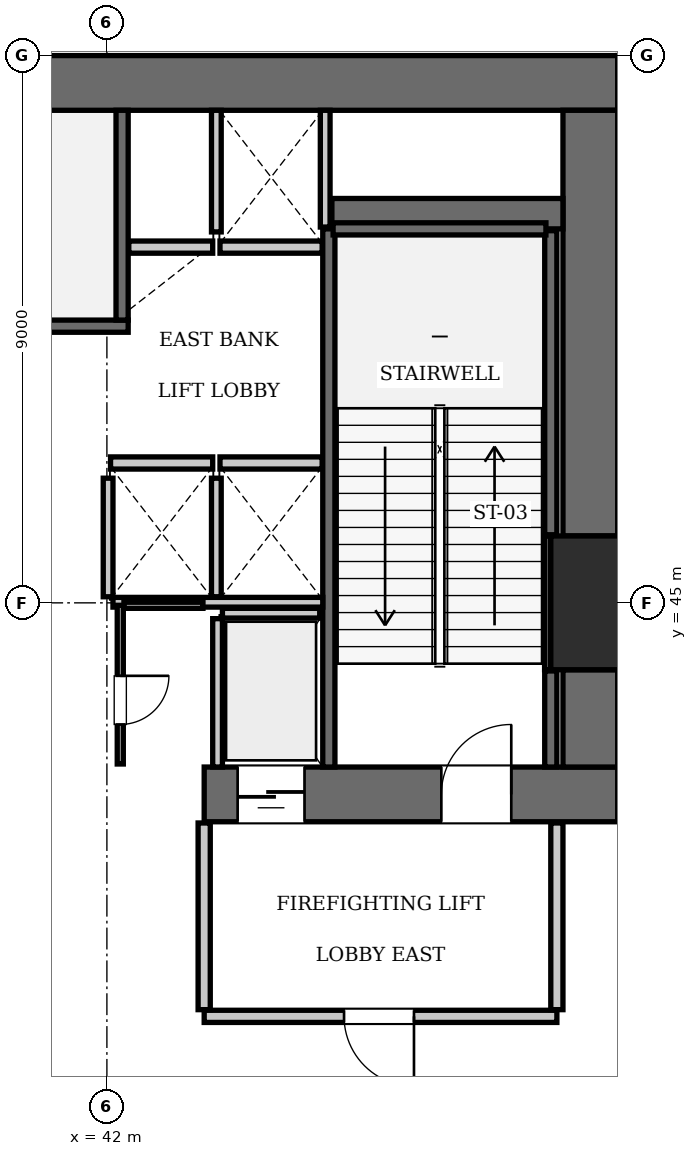
"""IFC4 building model, lengths in metres.
Left out: names, types, materials, properties, quantities, classifications, styles, units other than length and angle.
Written with IfcOpenShell. Run it as: python <this file> out.ifc"""

import sys

from ifc_helpers import new_model, si_unit, direction, frame, frame_2d, origin, origin_2d, place, context, subcontext, project, spatial, rectangle, extrude, element, fill, save


model = new_model("IFC4")
c1 = context("Model", 3, precision=1e-05, world=origin(), true_north=direction((0.0, 1.0)))
c2 = subcontext(c1, "Body", "Model", "MODEL_VIEW")
j1 = project(units=[si_unit("LENGTHUNIT", "METRE"), si_unit("PLANEANGLEUNIT", "RADIAN")], contexts=[c1])
p1 = place(None, origin())
s1 = spatial("IfcSite", under=j1, at=p1, CompositionType="ELEMENT")
p2 = place(p1, origin())
s2 = spatial("IfcBuilding", under=s1, at=p2, CompositionType="ELEMENT")
p3 = place(p2, frame((0.0, 0.0, 21.35)))
s3 = spatial("IfcBuildingStorey", under=s2, at=p3, CompositionType="ELEMENT", Elevation=21.35)
p4 = place(p3, frame((50.4, 45.0, 0.0), z_axis=(0.0, 0.0, 1.0), x_axis=(1.0, 0.0, 0.0)))
e1 = element("IfcColumn", 1, at=p4, inside=s3, PredefinedType="COLUMN", context=c2, shape_type="SweptSolid", body=[
    extrude(rectangle(XDim=2.2, YDim=2.2, at=origin_2d()), origin(), (0.0, 0.0, 1.0), 5.6),
])
p5 = place(p3, frame((25.2, 53.55, 0.0), z_axis=(0.0, 0.0, 1.0), x_axis=(1.0, 0.0, 0.0)))
e2 = element("IfcWall", 2, at=p5, inside=s3, PredefinedType="SHEAR", context=c2, shape_type="SweptSolid", body=[
    extrude(rectangle(XDim=25.2, YDim=0.9, at=frame_2d((12.6, 0.0))), origin(), (0.0, 0.0, 1.0), 5.6),
])
p6 = place(p3, frame((43.6, 41.85, 0.0), z_axis=(0.0, 0.0, 1.0), x_axis=(1.0, 0.0, 0.0)))
e3 = element("IfcWall", 3, at=p6, inside=s3, PredefinedType="SHEAR", context=c2, shape_type="SweptSolid", body=[
    extrude(rectangle(XDim=6.8, YDim=0.9, at=frame_2d((3.4, 0.0))), origin(), (0.0, 0.0, 1.0), 5.6),
])
p7 = place(p6, frame((3.9, 0.0, 0.0)))
e4 = element("IfcOpeningElement", 4, at=p7, cuts=e3, PredefinedType="OPENING", context=c2, shape_type="SweptSolid", body=[
    extrude(rectangle(XDim=1.15, YDim=2.15, at=frame_2d((0.575, 1.075))), frame((0.0, 0.46, 0.0), z_axis=(0.0, -1.0, 0.0), x_axis=(1.0, 0.0, 0.0)), (0.0, 0.0, 1.0), 0.92),
])
p8 = place(p6, frame((0.55, 0.0, 0.0)))
e5 = element("IfcOpeningElement", 5, at=p8, cuts=e3, PredefinedType="OPENING", context=c2, shape_type="SweptSolid", body=[
    extrude(rectangle(XDim=1.1, YDim=2.2, at=frame_2d((0.55, 1.1))), frame((0.0, 0.46, 0.0), z_axis=(0.0, -1.0, 0.0), x_axis=(1.0, 0.0, 0.0)), (0.0, 0.0, 1.0), 0.92),
])
p9 = place(p3, frame((49.95, 42.3, 0.0), z_axis=(0.0, 0.0, 1.0), x_axis=(0.0, 1.0, 0.0)))
e6 = element("IfcWall", 6, at=p9, inside=s3, PredefinedType="SHEAR", context=c2, shape_type="SweptSolid", body=[
    extrude(rectangle(XDim=1.6, YDim=0.9, at=frame_2d((0.8, 0.0))), origin(), (0.0, 0.0, 1.0), 5.6),
])
p10 = place(p3, frame((49.95, 46.1, 0.0), z_axis=(0.0, 0.0, 1.0), x_axis=(0.0, 1.0, 0.0)))
e7 = element("IfcWall", 7, at=p10, inside=s3, PredefinedType="SHEAR", context=c2, shape_type="SweptSolid", body=[
    extrude(rectangle(XDim=7.0, YDim=0.9, at=frame_2d((3.5, 0.0))), origin(), (0.0, 0.0, 1.0), 5.6),
])
p11 = place(p3, frame((45.7, 51.4, 0.0), z_axis=(0.0, 0.0, 1.0), x_axis=(1.0, 0.0, 0.0)))
e8 = element("IfcWall", 8, at=p11, inside=s3, PredefinedType="SHEAR", context=c2, shape_type="SweptSolid", body=[
    extrude(rectangle(XDim=3.8, YDim=0.5, at=frame_2d((1.9, 0.0))), origin(), (0.0, 0.0, 1.0), 5.6),
])
p12 = place(p3, frame((33.25, 49.55, 0.0), z_axis=(0.0, 0.0, 1.0), x_axis=(1.0, 0.0, 0.0)))
e9 = element("IfcWall", 9, at=p12, inside=s3, PredefinedType="SOLIDWALL", context=c2, shape_type="SweptSolid", body=[
    extrude(rectangle(XDim=9.1, YDim=0.2, at=frame_2d((4.55, 0.0))), origin(), (0.0, 0.0, 1.0), 5.36),
])
p13 = place(p3, frame((42.25, 49.65, 0.0), z_axis=(0.0, 0.0, 1.0), x_axis=(0.0, 1.0, 0.0)))
e10 = element("IfcWall", 10, at=p13, inside=s3, PredefinedType="SOLIDWALL", context=c2, shape_type="SweptSolid", body=[
    extrude(rectangle(XDim=3.45, YDim=0.2, at=frame_2d((1.725, 0.0))), origin(), (0.0, 0.0, 1.0), 5.36),
])
p14 = place(p3, frame((45.65, 42.3, 0.0), z_axis=(0.0, 0.0, 1.0), x_axis=(0.0, 1.0, 0.0)))
e11 = element("IfcWall", 11, at=p14, inside=s3, PredefinedType="SOLIDWALL", context=c2, shape_type="SweptSolid", body=[
    extrude(rectangle(XDim=8.85, YDim=0.2, at=frame_2d((4.425, 0.0))), origin(), (0.0, 0.0, 1.0), 5.36),
])
p15 = place(p3, frame((49.3, 42.3, 0.0), z_axis=(0.0, 0.0, 1.0), x_axis=(0.0, 1.0, 0.0)))
e12 = element("IfcWall", 12, at=p15, inside=s3, PredefinedType="SOLIDWALL", context=c2, shape_type="SweptSolid", body=[
    extrude(rectangle(XDim=1.58, YDim=0.2, at=frame_2d((0.79, 0.0))), origin(), (0.0, 0.0, 1.0), 5.36),
])
p16 = place(p3, frame((49.3, 46.12, 0.0), z_axis=(0.0, 0.0, 1.0), x_axis=(0.0, 1.0, 0.0)))
e13 = element("IfcWall", 13, at=p16, inside=s3, PredefinedType="SOLIDWALL", context=c2, shape_type="SweptSolid", body=[
    extrude(rectangle(XDim=5.0, YDim=0.2, at=frame_2d((2.5, 0.0))), origin(), (0.0, 0.0, 1.0), 5.36),
])
p17 = place(p3, frame((45.72, 51.15, 0.0), z_axis=(0.0, 0.0, 1.0), x_axis=(1.0, 0.0, 0.0)))
e14 = element("IfcWall", 14, at=p17, inside=s3, PredefinedType="SOLIDWALL", context=c2, shape_type="SweptSolid", body=[
    extrude(rectangle(XDim=3.5, YDim=0.2, at=frame_2d((1.75, 0.0))), origin(), (0.0, 0.0, 1.0), 5.36),
])
p18 = place(p3, frame((49.248, 43.9, 0.0), z_axis=(0.0, 0.0, 1.0), x_axis=(0.0, 1.0, 0.0)))
e15 = element("IfcWall", 15, at=p18, inside=s3, PredefinedType="SOLIDWALL", context=c2, shape_type="SweptSolid", body=[
    extrude(rectangle(XDim=2.2, YDim=0.1, at=frame_2d((1.1, 0.0))), origin(), (0.0, 0.0, 1.0), 5.36),
])
for number, where, z_axis, x_axis in (
    (16, (42.06, 47.3, 0.0), (0.0, 0.0, 1.0), (1.0, 0.0, 0.0)),
    (17, (43.86, 47.3, 0.0), (0.0, 0.0, 1.0), (1.0, 0.0, 0.0)),
):
    element("IfcWall", number, at=place(p3, frame(where, z_axis=z_axis, x_axis=x_axis)), inside=s3, PredefinedType="SOLIDWALL", context=c2, shape_type="SweptSolid", body=[
        extrude(rectangle(XDim=1.68, YDim=0.2, at=frame_2d((0.84, 0.0))), origin(), (0.0, 0.0, 1.0), 5.36),
    ])
p19 = place(p3, frame((42.36, 50.85, 0.0), z_axis=(0.0, 0.0, 1.0), x_axis=(1.0, 0.0, 0.0)))
e18 = element("IfcWall", 18, at=p19, inside=s3, PredefinedType="SOLIDWALL", context=c2, shape_type="SweptSolid", body=[
    extrude(rectangle(XDim=1.38, YDim=0.2, at=frame_2d((0.69, 0.0))), origin(), (0.0, 0.0, 1.0), 5.36),
])
p20 = place(p3, frame((43.86, 50.85, 0.0), z_axis=(0.0, 0.0, 1.0), x_axis=(1.0, 0.0, 0.0)))
e19 = element("IfcWall", 19, at=p20, inside=s3, PredefinedType="SOLIDWALL", context=c2, shape_type="SweptSolid", body=[
    extrude(rectangle(XDim=1.68, YDim=0.2, at=frame_2d((0.84, 0.0))), origin(), (0.0, 0.0, 1.0), 5.36),
])
p21 = place(p3, frame((43.9, 44.83, 0.0), z_axis=(0.0, 0.0, 1.0), x_axis=(1.0, 0.0, 0.0)))
e20 = element("IfcWall", 20, at=p21, inside=s3, PredefinedType="SOLIDWALL", context=c2, shape_type="SweptSolid", body=[
    extrude(rectangle(XDim=1.6, YDim=0.16, at=frame_2d((0.8, 0.0))), origin(), (0.0, 0.0, 1.0), 5.36),
])
p22 = place(p3, frame((43.82, 42.3, 0.0), z_axis=(0.0, 0.0, 1.0), x_axis=(0.0, 1.0, 0.0)))
e21 = element("IfcWall", 21, at=p22, inside=s3, PredefinedType="SOLIDWALL", context=c2, shape_type="SweptSolid", body=[
    extrude(rectangle(XDim=2.44, YDim=0.16, at=frame_2d((1.22, 0.0))), origin(), (0.0, 0.0, 1.0), 5.36),
])
for number, where, z_axis, x_axis in (
    (22, (42.02, 45.1, 0.0), (0.0, 0.0, 1.0), (0.0, 1.0, 0.0)),
    (23, (43.8, 45.1, 0.0), (0.0, 0.0, 1.0), (0.0, 1.0, 0.0)),
):
    element("IfcWall", number, at=place(p3, frame(where, z_axis=z_axis, x_axis=x_axis)), inside=s3, PredefinedType="SOLIDWALL", context=c2, shape_type="SweptSolid", body=[
        extrude(rectangle(XDim=1.95, YDim=0.16, at=frame_2d((0.975, 0.0))), origin(), (0.0, 0.0, 1.0), 5.36),
    ])
p23 = place(p3, frame((42.1, 45.01, 0.0), z_axis=(0.0, 0.0, 1.0), x_axis=(1.0, 0.0, 0.0)))
e24 = element("IfcWall", 24, at=p23, inside=s3, PredefinedType="SOLIDWALL", context=c2, shape_type="SweptSolid", body=[
    extrude(rectangle(XDim=3.45, YDim=0.16, at=frame_2d((1.725, 0.0))), origin(), (0.0, 0.0, 1.0), 5.36),
])
p24 = place(p3, frame((45.59, 51.18, 0.0), z_axis=(0.0, 0.0, 1.0), x_axis=(0.0, 1.0, 0.0)))
e25 = element("IfcWall", 25, at=p24, inside=s3, PredefinedType="SOLIDWALL", context=c2, shape_type="SweptSolid", body=[
    extrude(rectangle(XDim=1.92, YDim=0.16, at=frame_2d((0.96, 0.0))), origin(), (0.0, 0.0, 1.0), 5.36),
])
p25 = place(p3, frame((43.8, 51.1, 0.0), z_axis=(0.0, 0.0, 1.0), x_axis=(0.0, 1.0, 0.0)))
e26 = element("IfcWall", 26, at=p25, inside=s3, PredefinedType="SOLIDWALL", context=c2, shape_type="SweptSolid", body=[
    extrude(rectangle(XDim=2.0, YDim=0.16, at=frame_2d((1.0, 0.0))), origin(), (0.0, 0.0, 1.0), 5.36),
])
p26 = place(p3, frame((43.6, 38.2, 0.0), z_axis=(0.0, 0.0, 1.0), x_axis=(1.0, 0.0, 0.0)))
e27 = element("IfcWall", 27, at=p26, inside=s3, PredefinedType="PARTITIONING", context=c2, shape_type="SweptSolid", body=[
    extrude(rectangle(XDim=5.8, YDim=0.2, at=frame_2d((2.9, 0.0))), origin(), (0.0, 0.0, 1.0), 5.36),
])
p27 = place(p26, frame((2.3, 0.0, 0.0)))
e28 = element("IfcOpeningElement", 28, at=p27, cuts=e27, PredefinedType="OPENING", context=c2, shape_type="SweptSolid", body=[
    extrude(rectangle(XDim=1.15, YDim=2.15, at=frame_2d((0.575, 1.075))), frame((0.0, 0.11, 0.0), z_axis=(0.0, -1.0, 0.0), x_axis=(1.0, 0.0, 0.0)), (0.0, 0.0, 1.0), 0.22),
])
for number, where, z_axis, x_axis in (
    (29, (43.6, 38.31, 0.0), (0.0, 0.0, 1.0), (0.0, 1.0, 0.0)),
    (30, (49.4, 38.31, 0.0), (0.0, 0.0, 1.0), (0.0, 1.0, 0.0)),
):
    element("IfcWall", number, at=place(p3, frame(where, z_axis=z_axis, x_axis=x_axis)), inside=s3, PredefinedType="PARTITIONING", context=c2, shape_type="SweptSolid", body=[
        extrude(rectangle(XDim=3.07, YDim=0.2, at=frame_2d((1.535, 0.0))), origin(), (0.0, 0.0, 1.0), 5.36),
    ])
p28 = place(p3, frame((42.22, 42.35, 0.0), z_axis=(0.0, 0.0, 1.0), x_axis=(0.0, 1.0, 0.0)))
e31 = element("IfcWall", 31, at=p28, inside=s3, PredefinedType="PARTITIONING", context=c2, shape_type="SweptSolid", body=[
    extrude(rectangle(XDim=2.61, YDim=0.1, at=frame_2d((1.305, 0.0))), origin(), (0.0, 0.0, 1.0), 5.36),
])
p29 = place(p28, frame((0.65, 0.0, 0.0)))
e32 = element("IfcOpeningElement", 32, at=p29, cuts=e31, PredefinedType="OPENING", context=c2, shape_type="SweptSolid", body=[
    extrude(rectangle(XDim=0.8, YDim=2.05, at=frame_2d((0.4, 1.025))), frame((0.0, 0.06, 0.0), z_axis=(0.0, -1.0, 0.0), x_axis=(1.0, 0.0, 0.0)), (0.0, 0.0, 1.0), 0.12),
])
p30 = place(p3, frame((42.28, 44.96, 0.0), z_axis=(0.0, 0.0, 1.0), x_axis=(1.0, 0.0, 0.0)))
e33 = element("IfcWall", 33, at=p30, inside=s3, PredefinedType="PARTITIONING", context=c2, shape_type="SweptSolid", body=[
    extrude(rectangle(XDim=1.3, YDim=0.1, at=frame_2d((0.65, 0.0))), origin(), (0.0, 0.0, 1.0), 5.36),
])
p31 = place(p7, origin())
e34 = element("IfcDoor", 34, at=p31, inside=s3, OperationType="SINGLE_SWING_RIGHT", PredefinedType="DOOR", context=c2, shape_type="SweptSolid", body=[
    extrude(rectangle(XDim=1.15, YDim=2.15, at=frame_2d((0.575, 1.075))), frame((0.0, 0.025, 0.0), z_axis=(0.0, -1.0, 0.0), x_axis=(1.0, 0.0, 0.0)), (0.0, 0.0, 1.0), 0.05),
])
fill(e4, e34)
p32 = place(p8, frame((1.1, 0.0, 0.0), z_axis=(0.0, 0.0, 1.0), x_axis=(-1.0, 0.0, 0.0)))
e35 = element("IfcDoor", 35, at=p32, inside=s3, OperationType="SLIDING_TO_LEFT", PredefinedType="DOOR", context=c2, shape_type="SweptSolid", body=[
    extrude(rectangle(XDim=1.1, YDim=2.2, at=frame_2d((0.55, 1.1))), frame((0.0, 0.025, 0.0), z_axis=(0.0, -1.0, 0.0), x_axis=(1.0, 0.0, 0.0)), (0.0, 0.0, 1.0), 0.05),
])
fill(e5, e35)
p33 = place(p27, frame((1.15, 0.0, 0.0), z_axis=(0.0, 0.0, 1.0), x_axis=(-1.0, 0.0, 0.0)))
e36 = element("IfcDoor", 36, at=p33, inside=s3, OperationType="SINGLE_SWING_LEFT", PredefinedType="DOOR", context=c2, shape_type="SweptSolid", body=[
    extrude(rectangle(XDim=1.15, YDim=2.15, at=frame_2d((0.575, 1.075))), frame((0.0, 0.025, 0.0), z_axis=(0.0, -1.0, 0.0), x_axis=(1.0, 0.0, 0.0)), (0.0, 0.0, 1.0), 0.05),
])
fill(e28, e36)
p34 = place(p29, frame((0.8, 0.0, 0.0), z_axis=(0.0, 0.0, 1.0), x_axis=(-1.0, 0.0, 0.0)))
e37 = element("IfcDoor", 37, at=p34, inside=s3, OperationType="SINGLE_SWING_LEFT", PredefinedType="DOOR", context=c2, shape_type="SweptSolid", body=[
    extrude(rectangle(XDim=0.8, YDim=2.05, at=frame_2d((0.4, 1.025))), frame((0.0, 0.025, 0.0), z_axis=(0.0, -1.0, 0.0), x_axis=(1.0, 0.0, 0.0)), (0.0, 0.0, 1.0), 0.05),
])
fill(e32, e37)
save(model, sys.argv[1])
